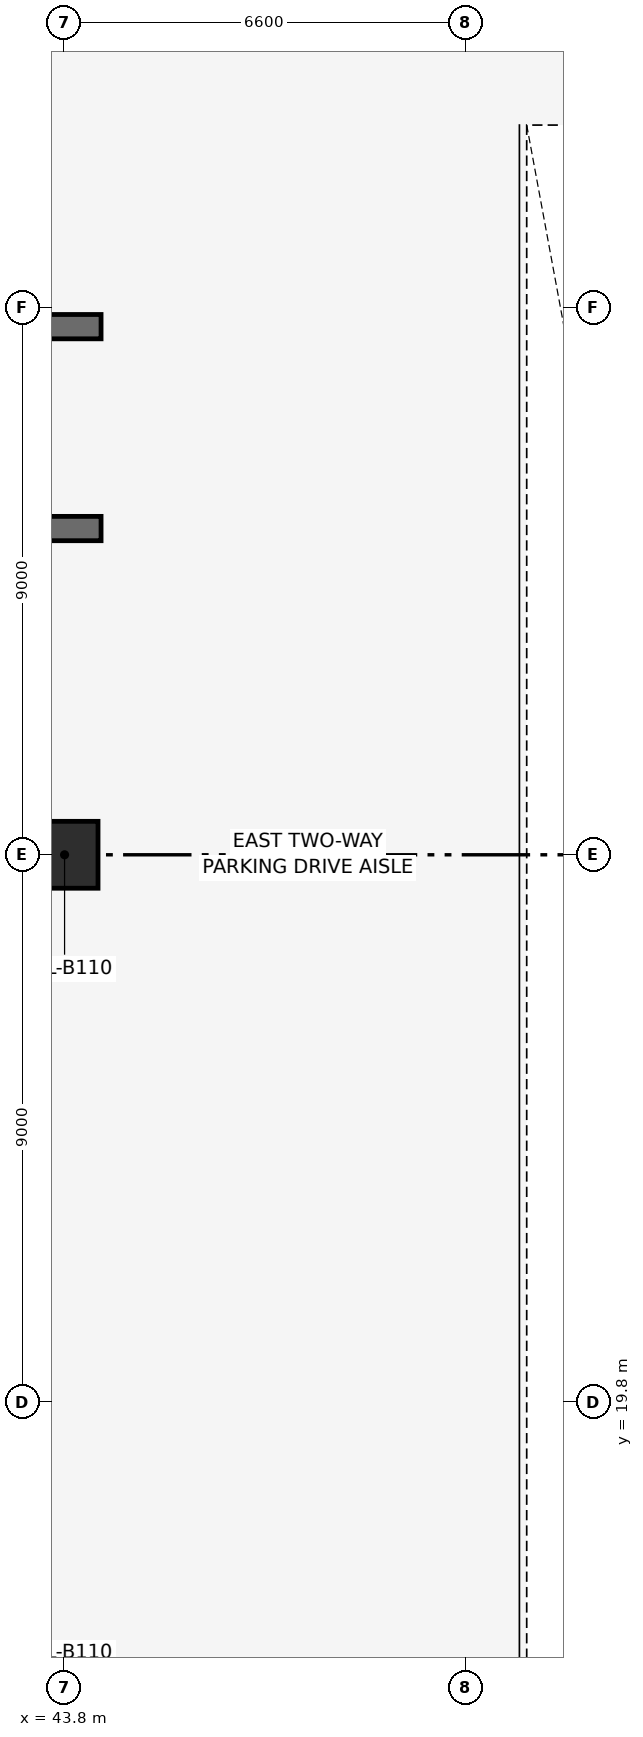
"""IFC4 building model, lengths in metres.
Left out: names, types, materials, properties, quantities, classifications, styles, units other than length and angle.
Written with IfcOpenShell. Run it as: python <this file> out.ifc"""

import sys

from ifc_helpers import new_model, si_unit, direction, frame, frame_2d, origin, origin_2d, place, context, subcontext, project, spatial, rectangle, extrude, element, save


model = new_model("IFC4")
c1 = context("Model", 3, precision=1e-05, world=origin(), true_north=direction((0.0, 1.0)))
c2 = subcontext(c1, "Body", "Model", "MODEL_VIEW")
j1 = project(units=[si_unit("LENGTHUNIT", "METRE"), si_unit("PLANEANGLEUNIT", "RADIAN")], contexts=[c1])
p1 = place(None, origin())
s1 = spatial("IfcSite", under=j1, at=p1, CompositionType="ELEMENT")
p2 = place(p1, origin())
s2 = spatial("IfcBuilding", under=s1, at=p2, CompositionType="ELEMENT")
p3 = place(p2, frame((0.0, 0.0, -4.8)))
s3 = spatial("IfcBuildingStorey", under=s2, at=p3, CompositionType="ELEMENT", Elevation=-4.8)
p4 = place(p3, frame((43.8, 28.8, 0.002), z_axis=(0.0, 0.0, 1.0), x_axis=(1.0, 0.0, 0.0)))
e1 = element("IfcColumn", 1, at=p4, inside=s3, PredefinedType="COLUMN", context=c2, shape_type="SweptSolid", body=[
    extrude(rectangle(XDim=1.1, YDim=1.1, at=origin_2d()), origin(), (0.0, 0.0, 1.0), 4.796),
])
for number, where, z_axis, x_axis in (
    (2, (39.7, 34.165, 0.002), (0.0, 0.0, 1.0), (1.0, 0.0, 0.0)),
    (3, (39.7, 37.485, 0.002), (0.0, 0.0, 1.0), (1.0, 0.0, 0.0)),
):
    element("IfcWall", number, at=place(p3, frame(where, z_axis=z_axis, x_axis=x_axis)), inside=s3, PredefinedType="SHEAR", context=c2, shape_type="SweptSolid", body=[
        extrude(rectangle(XDim=4.7, YDim=0.4, at=frame_2d((2.35, 0.0))), origin(), (0.0, 0.0, 1.0), 4.396),
    ])
save(model, sys.argv[1])
